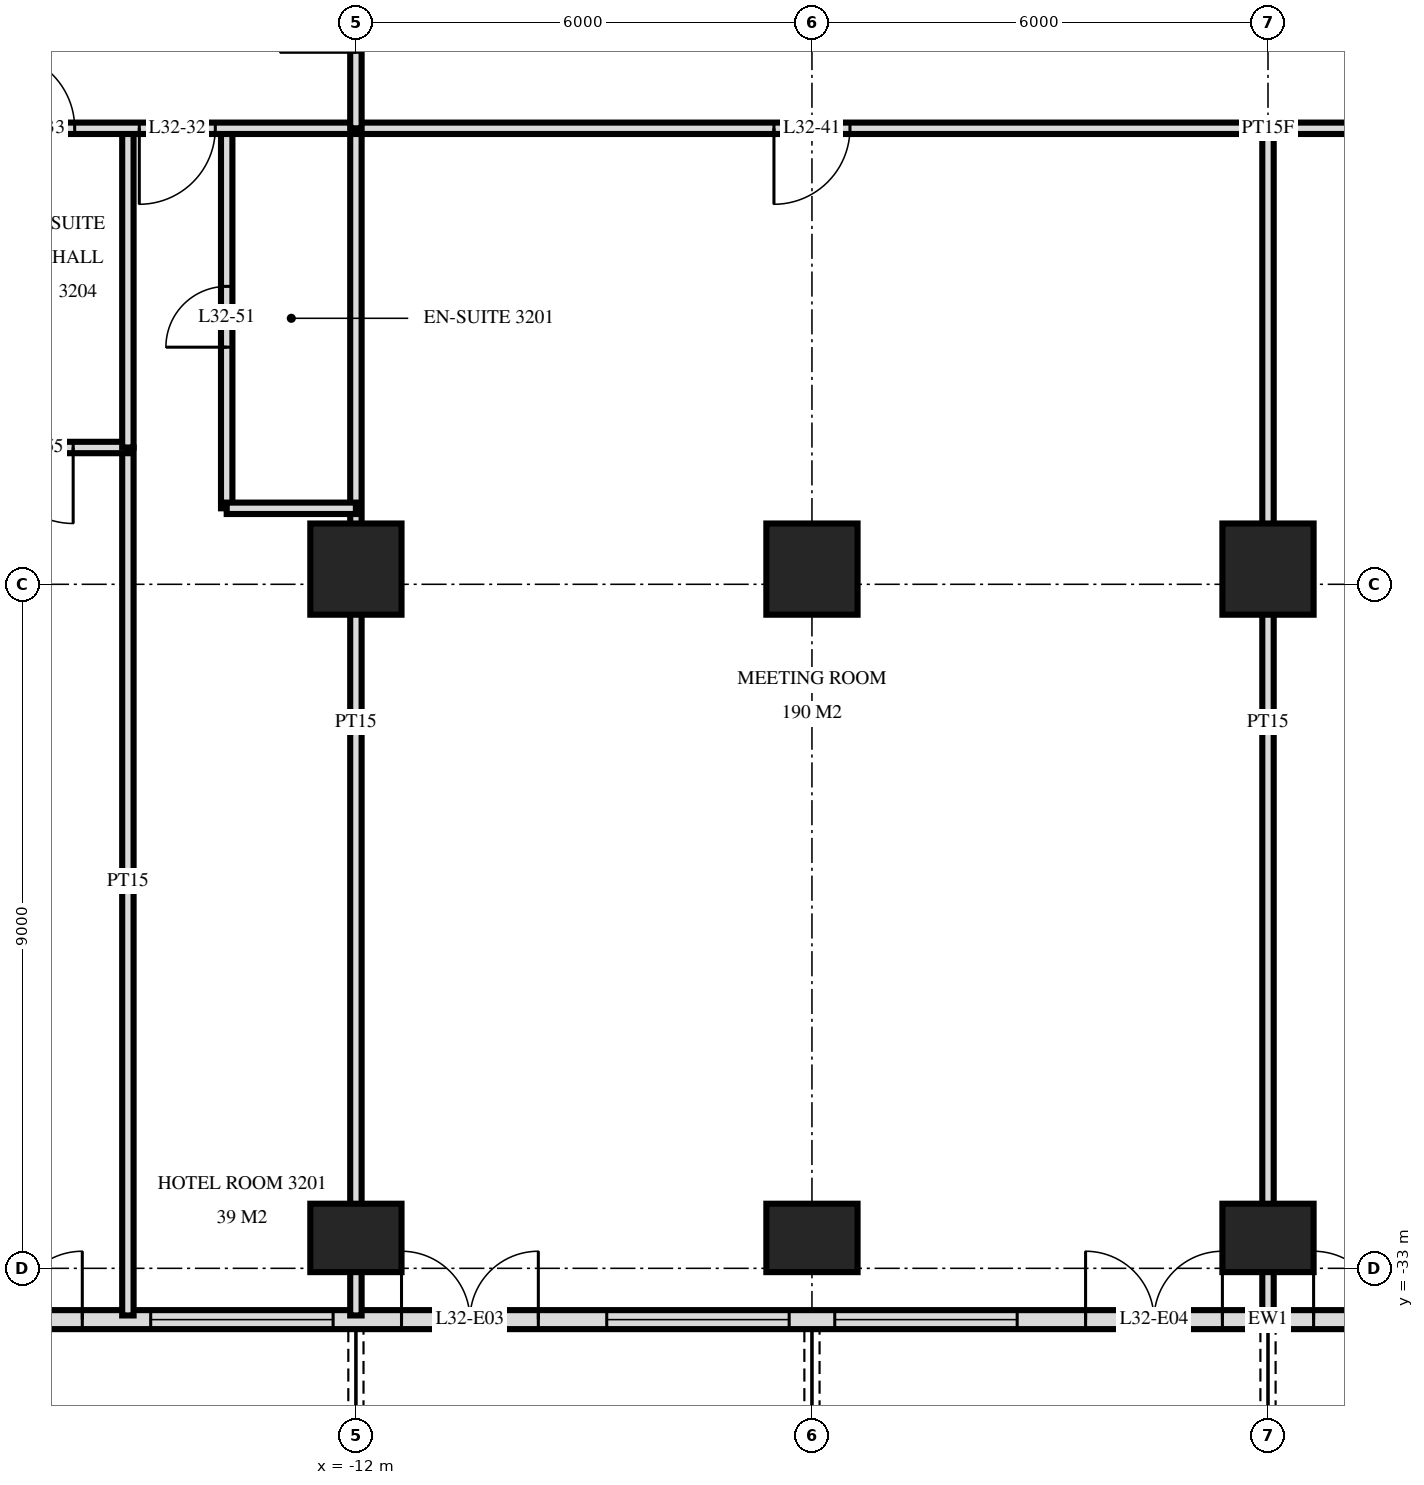
"""IFC4 building model, lengths in metres.
Left out: names, types, materials, properties, quantities, classifications, styles, units other than length and angle.
Written with IfcOpenShell. Run it as: python <this file> out.ifc"""

import sys

from ifc_helpers import new_model, si_unit, direction, frame, frame_2d, origin, origin_2d, place, context, subcontext, project, spatial, rectangle, extrude, element, fill, save


model = new_model("IFC4")
c1 = context("Model", 3, precision=1e-05, world=origin(), true_north=direction((0.0, 1.0)))
c2 = subcontext(c1, "Body", "Model", "MODEL_VIEW")
j1 = project(units=[si_unit("LENGTHUNIT", "METRE"), si_unit("PLANEANGLEUNIT", "RADIAN")], contexts=[c1])
p1 = place(None, origin())
s1 = spatial("IfcSite", under=j1, at=p1, CompositionType="ELEMENT")
p2 = place(p1, origin())
s2 = spatial("IfcBuilding", under=s1, at=p2, CompositionType="ELEMENT")
p3 = place(p2, frame((0.0, 0.0, 127.2)))
s3 = spatial("IfcBuildingStorey", under=s2, at=p3, CompositionType="ELEMENT", Elevation=127.2)
p4 = place(p3, frame((-12.0, -32.6, 0.0), z_axis=(0.0, 0.0, 1.0), x_axis=(1.0, 0.0, 0.0)))
e1 = element("IfcColumn", 1, at=p4, inside=s3, PredefinedType="COLUMN", context=c2, shape_type="SweptSolid", body=[
    extrude(rectangle(XDim=1.2, YDim=0.9, at=origin_2d()), origin(), (0.0, 0.0, 1.0), 3.6),
])
p5 = place(p3, frame((-12.0, -23.8, 0.0), z_axis=(0.0, 0.0, 1.0), x_axis=(1.0, 0.0, 0.0)))
e2 = element("IfcColumn", 2, at=p5, inside=s3, PredefinedType="COLUMN", context=c2, shape_type="SweptSolid", body=[
    extrude(rectangle(XDim=1.2, YDim=1.2, at=origin_2d()), origin(), (0.0, 0.0, 1.0), 3.6),
])
p6 = place(p3, frame((-6.0, -32.6, 0.0), z_axis=(0.0, 0.0, 1.0), x_axis=(1.0, 0.0, 0.0)))
e3 = element("IfcColumn", 3, at=p6, inside=s3, PredefinedType="COLUMN", context=c2, shape_type="SweptSolid", body=[
    extrude(rectangle(XDim=1.2, YDim=0.9, at=origin_2d()), origin(), (0.0, 0.0, 1.0), 3.6),
])
p7 = place(p3, frame((-6.0, -23.8, 0.0), z_axis=(0.0, 0.0, 1.0), x_axis=(1.0, 0.0, 0.0)))
e4 = element("IfcColumn", 4, at=p7, inside=s3, PredefinedType="COLUMN", context=c2, shape_type="SweptSolid", body=[
    extrude(rectangle(XDim=1.2, YDim=1.2, at=origin_2d()), origin(), (0.0, 0.0, 1.0), 3.6),
])
p8 = place(p3, frame((0.0, -32.6, 0.0), z_axis=(0.0, 0.0, 1.0), x_axis=(1.0, 0.0, 0.0)))
e5 = element("IfcColumn", 5, at=p8, inside=s3, PredefinedType="COLUMN", context=c2, shape_type="SweptSolid", body=[
    extrude(rectangle(XDim=1.2, YDim=0.9, at=origin_2d()), origin(), (0.0, 0.0, 1.0), 3.6),
])
p9 = place(p3, frame((0.0, -23.8, 0.0), z_axis=(0.0, 0.0, 1.0), x_axis=(1.0, 0.0, 0.0)))
e6 = element("IfcColumn", 6, at=p9, inside=s3, PredefinedType="COLUMN", context=c2, shape_type="SweptSolid", body=[
    extrude(rectangle(XDim=1.2, YDim=1.2, at=origin_2d()), origin(), (0.0, 0.0, 1.0), 3.6),
])
p10 = place(p3, frame((-23.675, -33.675, 0.0), z_axis=(0.0, 0.0, 1.0), x_axis=(1.0, 0.0, 0.0)))
e7 = element("IfcWall", 7, at=p10, inside=s3, PredefinedType="SOLIDWALL", context=c2, shape_type="SweptSolid", body=[
    extrude(rectangle(XDim=47.351, YDim=0.25, at=frame_2d((23.675, 0.0))), origin(), (0.0, 0.0, 1.0), 3.32),
])
p11 = place(p10, frame((3.425, 0.0, 0.0)))
e8 = element("IfcOpeningElement", 8, at=p11, cuts=e7, PredefinedType="OPENING", context=c2, shape_type="SweptSolid", body=[
    extrude(rectangle(XDim=1.8, YDim=2.4, at=frame_2d((0.9, 1.2))), frame((0.0, 0.135, 0.0), z_axis=(0.0, -1.0, 0.0), x_axis=(1.0, 0.0, 0.0)), (0.0, 0.0, 1.0), 0.27),
])
p12 = place(p10, frame((6.275, 0.0, 0.0)))
e9 = element("IfcOpeningElement", 9, at=p12, cuts=e7, PredefinedType="OPENING", context=c2, shape_type="SweptSolid", body=[
    extrude(rectangle(XDim=1.8, YDim=2.4, at=frame_2d((0.9, 1.2))), frame((0.0, 0.135, 0.0), z_axis=(0.0, -1.0, 0.0), x_axis=(1.0, 0.0, 0.0)), (0.0, 0.0, 1.0), 0.27),
])
p13 = place(p10, frame((8.975, 0.0, 0.3)))
e10 = element("IfcOpeningElement", 10, at=p13, cuts=e7, PredefinedType="OPENING", context=c2, shape_type="SweptSolid", body=[
    extrude(rectangle(XDim=2.4, YDim=2.1, at=frame_2d((1.2, 1.05))), frame((0.0, 0.135, 0.0), z_axis=(0.0, -1.0, 0.0), x_axis=(1.0, 0.0, 0.0)), (0.0, 0.0, 1.0), 0.27),
])
p14 = place(p10, frame((12.275, 0.0, 0.0)))
e11 = element("IfcOpeningElement", 11, at=p14, cuts=e7, PredefinedType="OPENING", context=c2, shape_type="SweptSolid", body=[
    extrude(rectangle(XDim=1.8, YDim=2.4, at=frame_2d((0.9, 1.2))), frame((0.0, 0.135, 0.0), z_axis=(0.0, -1.0, 0.0), x_axis=(1.0, 0.0, 0.0)), (0.0, 0.0, 1.0), 0.27),
])
p15 = place(p10, frame((14.975, 0.0, 0.3)))
e12 = element("IfcOpeningElement", 12, at=p15, cuts=e7, PredefinedType="OPENING", context=c2, shape_type="SweptSolid", body=[
    extrude(rectangle(XDim=2.4, YDim=2.1, at=frame_2d((1.2, 1.05))), frame((0.0, 0.135, 0.0), z_axis=(0.0, -1.0, 0.0), x_axis=(1.0, 0.0, 0.0)), (0.0, 0.0, 1.0), 0.27),
])
p16 = place(p10, frame((17.975, 0.0, 0.3)))
e13 = element("IfcOpeningElement", 13, at=p16, cuts=e7, PredefinedType="OPENING", context=c2, shape_type="SweptSolid", body=[
    extrude(rectangle(XDim=2.4, YDim=2.1, at=frame_2d((1.2, 1.05))), frame((0.0, 0.135, 0.0), z_axis=(0.0, -1.0, 0.0), x_axis=(1.0, 0.0, 0.0)), (0.0, 0.0, 1.0), 0.27),
])
p17 = place(p10, frame((21.275, 0.0, 0.0)))
e14 = element("IfcOpeningElement", 14, at=p17, cuts=e7, PredefinedType="OPENING", context=c2, shape_type="SweptSolid", body=[
    extrude(rectangle(XDim=1.8, YDim=2.4, at=frame_2d((0.9, 1.2))), frame((0.0, 0.135, 0.0), z_axis=(0.0, -1.0, 0.0), x_axis=(1.0, 0.0, 0.0)), (0.0, 0.0, 1.0), 0.27),
])
p18 = place(p10, frame((24.275, 0.0, 0.0)))
e15 = element("IfcOpeningElement", 15, at=p18, cuts=e7, PredefinedType="OPENING", context=c2, shape_type="SweptSolid", body=[
    extrude(rectangle(XDim=1.8, YDim=2.4, at=frame_2d((0.9, 1.2))), frame((0.0, 0.135, 0.0), z_axis=(0.0, -1.0, 0.0), x_axis=(1.0, 0.0, 0.0)), (0.0, 0.0, 1.0), 0.27),
])
p19 = place(p10, frame((26.975, 0.0, 0.3)))
e16 = element("IfcOpeningElement", 16, at=p19, cuts=e7, PredefinedType="OPENING", context=c2, shape_type="SweptSolid", body=[
    extrude(rectangle(XDim=2.4, YDim=2.1, at=frame_2d((1.2, 1.05))), frame((0.0, 0.135, 0.0), z_axis=(0.0, -1.0, 0.0), x_axis=(1.0, 0.0, 0.0)), (0.0, 0.0, 1.0), 0.27),
])
p20 = place(p10, frame((30.275, 0.0, 0.0)))
e17 = element("IfcOpeningElement", 17, at=p20, cuts=e7, PredefinedType="OPENING", context=c2, shape_type="SweptSolid", body=[
    extrude(rectangle(XDim=1.8, YDim=2.4, at=frame_2d((0.9, 1.2))), frame((0.0, 0.135, 0.0), z_axis=(0.0, -1.0, 0.0), x_axis=(1.0, 0.0, 0.0)), (0.0, 0.0, 1.0), 0.27),
])
p21 = place(p10, frame((32.975, 0.0, 0.3)))
e18 = element("IfcOpeningElement", 18, at=p21, cuts=e7, PredefinedType="OPENING", context=c2, shape_type="SweptSolid", body=[
    extrude(rectangle(XDim=2.4, YDim=2.1, at=frame_2d((1.2, 1.05))), frame((0.0, 0.135, 0.0), z_axis=(0.0, -1.0, 0.0), x_axis=(1.0, 0.0, 0.0)), (0.0, 0.0, 1.0), 0.27),
])
p22 = place(p10, frame((36.275, 0.0, 0.0)))
e19 = element("IfcOpeningElement", 19, at=p22, cuts=e7, PredefinedType="OPENING", context=c2, shape_type="SweptSolid", body=[
    extrude(rectangle(XDim=1.8, YDim=2.4, at=frame_2d((0.9, 1.2))), frame((0.0, 0.135, 0.0), z_axis=(0.0, -1.0, 0.0), x_axis=(1.0, 0.0, 0.0)), (0.0, 0.0, 1.0), 0.27),
])
p23 = place(p10, frame((38.975, 0.0, 0.3)))
e20 = element("IfcOpeningElement", 20, at=p23, cuts=e7, PredefinedType="OPENING", context=c2, shape_type="SweptSolid", body=[
    extrude(rectangle(XDim=2.4, YDim=2.1, at=frame_2d((1.2, 1.05))), frame((0.0, 0.135, 0.0), z_axis=(0.0, -1.0, 0.0), x_axis=(1.0, 0.0, 0.0)), (0.0, 0.0, 1.0), 0.27),
])
p24 = place(p10, frame((41.975, 0.0, 0.3)))
e21 = element("IfcOpeningElement", 21, at=p24, cuts=e7, PredefinedType="OPENING", context=c2, shape_type="SweptSolid", body=[
    extrude(rectangle(XDim=2.4, YDim=2.1, at=frame_2d((1.2, 1.05))), frame((0.0, 0.135, 0.0), z_axis=(0.0, -1.0, 0.0), x_axis=(1.0, 0.0, 0.0)), (0.0, 0.0, 1.0), 0.27),
])
p25 = place(p10, frame((45.125, 0.0, 0.0)))
e22 = element("IfcOpeningElement", 22, at=p25, cuts=e7, PredefinedType="OPENING", context=c2, shape_type="SweptSolid", body=[
    extrude(rectangle(XDim=1.8, YDim=2.4, at=frame_2d((0.9, 1.2))), frame((0.0, 0.135, 0.0), z_axis=(0.0, -1.0, 0.0), x_axis=(1.0, 0.0, 0.0)), (0.0, 0.0, 1.0), 0.27),
])
p26 = place(p3, frame((0.0, -33.62, 0.0), z_axis=(0.0, 0.0, 1.0), x_axis=(0.0, 1.0, 0.0)))
e23 = element("IfcWall", 23, at=p26, inside=s3, PredefinedType="PARTITIONING", context=c2, shape_type="SweptSolid", body=[
    extrude(rectangle(XDim=15.62, YDim=0.15, at=frame_2d((7.81, 0.0))), origin(), (0.0, 0.0, 1.0), 3.32),
])
p27 = place(p3, frame((-12.0, -18.0, 0.0), z_axis=(0.0, 0.0, 1.0), x_axis=(0.0, 1.0, 0.0)))
e24 = element("IfcWall", 24, at=p27, inside=s3, PredefinedType="PARTITIONING", context=c2, shape_type="SweptSolid", body=[
    extrude(rectangle(XDim=2.95, YDim=0.15, at=frame_2d((1.475, 0.0))), origin(), (0.0, 0.0, 1.0), 3.32),
])
p28 = place(p27, frame((1.0, 0.0, 0.0)))
e25 = element("IfcOpeningElement", 25, at=p28, cuts=e24, PredefinedType="OPENING", context=c2, shape_type="SweptSolid", body=[
    extrude(rectangle(XDim=1.0, YDim=2.1, at=frame_2d((0.5, 1.05))), frame((0.0, 0.085, 0.0), z_axis=(0.0, -1.0, 0.0), x_axis=(1.0, 0.0, 0.0)), (0.0, 0.0, 1.0), 0.17),
])
p29 = place(p3, frame((-12.0, -33.62, 0.0), z_axis=(0.0, 0.0, 1.0), x_axis=(0.0, 1.0, 0.0)))
e26 = element("IfcWall", 26, at=p29, inside=s3, PredefinedType="PARTITIONING", context=c2, shape_type="SweptSolid", body=[
    extrude(rectangle(XDim=15.62, YDim=0.15, at=frame_2d((7.81, 0.0))), origin(), (0.0, 0.0, 1.0), 3.32),
])
p30 = place(p3, frame((-13.7, -23.0, 0.0), z_axis=(0.0, 0.0, 1.0), x_axis=(0.0, 1.0, 0.0)))
e27 = element("IfcWall", 27, at=p30, inside=s3, PredefinedType="PARTITIONING", context=c2, shape_type="SweptSolid", body=[
    extrude(rectangle(XDim=5.0, YDim=0.15, at=frame_2d((2.5, 0.0))), origin(), (0.0, 0.0, 1.0), 3.32),
])
p31 = place(p30, frame((2.12, 0.0, 0.0)))
e28 = element("IfcOpeningElement", 28, at=p31, cuts=e27, PredefinedType="OPENING", context=c2, shape_type="SweptSolid", body=[
    extrude(rectangle(XDim=0.8, YDim=2.1, at=frame_2d((0.4, 1.05))), frame((0.0, 0.085, 0.0), z_axis=(0.0, -1.0, 0.0), x_axis=(1.0, 0.0, 0.0)), (0.0, 0.0, 1.0), 0.17),
])
p32 = place(p3, frame((-15.0, -22.2, 0.0), z_axis=(0.0, 0.0, 1.0), x_axis=(0.0, 1.0, 0.0)))
e29 = element("IfcWall", 29, at=p32, inside=s3, PredefinedType="PARTITIONING", context=c2, shape_type="SweptSolid", body=[
    extrude(rectangle(XDim=4.2, YDim=0.15, at=frame_2d((2.1, 0.0))), origin(), (0.0, 0.0, 1.0), 3.32),
])
p33 = place(p3, frame((-15.0, -33.62, 0.0), z_axis=(0.0, 0.0, 1.0), x_axis=(0.0, 1.0, 0.0)))
e30 = element("IfcWall", 30, at=p33, inside=s3, PredefinedType="PARTITIONING", context=c2, shape_type="SweptSolid", body=[
    extrude(rectangle(XDim=11.42, YDim=0.15, at=frame_2d((5.71, 0.0))), origin(), (0.0, 0.0, 1.0), 3.32),
])
p34 = place(p3, frame((-13.7, -23.0, 0.0), z_axis=(0.0, 0.0, 1.0), x_axis=(1.0, 0.0, 0.0)))
e31 = element("IfcWall", 31, at=p34, inside=s3, PredefinedType="PARTITIONING", context=c2, shape_type="SweptSolid", body=[
    extrude(rectangle(XDim=1.7, YDim=0.15, at=frame_2d((0.85, 0.0))), origin(), (0.0, 0.0, 1.0), 3.32),
])
p35 = place(p3, frame((-17.4, -22.2, 0.0), z_axis=(0.0, 0.0, 1.0), x_axis=(1.0, 0.0, 0.0)))
e32 = element("IfcWall", 32, at=p35, inside=s3, PredefinedType="PARTITIONING", context=c2, shape_type="SweptSolid", body=[
    extrude(rectangle(XDim=2.4, YDim=0.15, at=frame_2d((1.2, 0.0))), origin(), (0.0, 0.0, 1.0), 3.32),
])
p36 = place(p35, frame((0.68, 0.0, 0.0)))
e33 = element("IfcOpeningElement", 33, at=p36, cuts=e32, PredefinedType="OPENING", context=c2, shape_type="SweptSolid", body=[
    extrude(rectangle(XDim=1.0, YDim=2.1, at=frame_2d((0.5, 1.05))), frame((0.0, 0.085, 0.0), z_axis=(0.0, -1.0, 0.0), x_axis=(1.0, 0.0, 0.0)), (0.0, 0.0, 1.0), 0.17),
])
p37 = place(p3, frame((-28.02, -18.0, 0.0), z_axis=(0.0, 0.0, 1.0), x_axis=(1.0, 0.0, 0.0)))
e34 = element("IfcWall", 34, at=p37, inside=s3, PredefinedType="PARTITIONING", context=c2, shape_type="SweptSolid", body=[
    extrude(rectangle(XDim=56.04, YDim=0.15, at=frame_2d((28.02, 0.0))), origin(), (0.0, 0.0, 1.0), 3.32),
])
p38 = place(p37, frame((13.17, 0.0, 0.0)))
e35 = element("IfcOpeningElement", 35, at=p38, cuts=e34, PredefinedType="OPENING", context=c2, shape_type="SweptSolid", body=[
    extrude(rectangle(XDim=1.0, YDim=2.1, at=frame_2d((0.5, 1.05))), frame((0.0, 0.085, 0.0), z_axis=(0.0, -1.0, 0.0), x_axis=(1.0, 0.0, 0.0)), (0.0, 0.0, 1.0), 0.17),
])
p39 = place(p37, frame((11.32, 0.0, 0.0)))
e36 = element("IfcOpeningElement", 36, at=p39, cuts=e34, PredefinedType="OPENING", context=c2, shape_type="SweptSolid", body=[
    extrude(rectangle(XDim=1.0, YDim=2.1, at=frame_2d((0.5, 1.05))), frame((0.0, 0.085, 0.0), z_axis=(0.0, -1.0, 0.0), x_axis=(1.0, 0.0, 0.0)), (0.0, 0.0, 1.0), 0.17),
])
p40 = place(p37, frame((41.87, 0.0, 0.0)))
e37 = element("IfcOpeningElement", 37, at=p40, cuts=e34, PredefinedType="OPENING", context=c2, shape_type="SweptSolid", body=[
    extrude(rectangle(XDim=1.0, YDim=2.1, at=frame_2d((0.5, 1.05))), frame((0.0, 0.085, 0.0), z_axis=(0.0, -1.0, 0.0), x_axis=(1.0, 0.0, 0.0)), (0.0, 0.0, 1.0), 0.17),
])
p41 = place(p37, frame((43.17, 0.0, 0.0)))
e38 = element("IfcOpeningElement", 38, at=p41, cuts=e34, PredefinedType="OPENING", context=c2, shape_type="SweptSolid", body=[
    extrude(rectangle(XDim=1.0, YDim=2.1, at=frame_2d((0.5, 1.05))), frame((0.0, 0.085, 0.0), z_axis=(0.0, -1.0, 0.0), x_axis=(1.0, 0.0, 0.0)), (0.0, 0.0, 1.0), 0.17),
])
p42 = place(p37, frame((46.72, 0.0, 0.0)))
e39 = element("IfcOpeningElement", 39, at=p42, cuts=e34, PredefinedType="OPENING", context=c2, shape_type="SweptSolid", body=[
    extrude(rectangle(XDim=1.0, YDim=2.1, at=frame_2d((0.5, 1.05))), frame((0.0, 0.085, 0.0), z_axis=(0.0, -1.0, 0.0), x_axis=(1.0, 0.0, 0.0)), (0.0, 0.0, 1.0), 0.17),
])
p43 = place(p37, frame((21.52, 0.0, 0.0)))
e40 = element("IfcOpeningElement", 40, at=p43, cuts=e34, PredefinedType="OPENING", context=c2, shape_type="SweptSolid", body=[
    extrude(rectangle(XDim=1.0, YDim=2.1, at=frame_2d((0.5, 1.05))), frame((0.0, 0.085, 0.0), z_axis=(0.0, -1.0, 0.0), x_axis=(1.0, 0.0, 0.0)), (0.0, 0.0, 1.0), 0.17),
])
p44 = place(p37, frame((33.52, 0.0, 0.0)))
e41 = element("IfcOpeningElement", 41, at=p44, cuts=e34, PredefinedType="OPENING", context=c2, shape_type="SweptSolid", body=[
    extrude(rectangle(XDim=1.0, YDim=2.1, at=frame_2d((0.5, 1.05))), frame((0.0, 0.085, 0.0), z_axis=(0.0, -1.0, 0.0), x_axis=(1.0, 0.0, 0.0)), (0.0, 0.0, 1.0), 0.17),
])
p45 = place(p12, origin())
e42 = element("IfcDoor", 42, at=p45, inside=s3, OperationType="DOUBLE_DOOR_SINGLE_SWING", PredefinedType="DOOR", context=c2, shape_type="SweptSolid", body=[
    extrude(rectangle(XDim=1.8, YDim=2.4, at=frame_2d((0.9, 1.2))), frame((0.0, 0.025, 0.0), z_axis=(0.0, -1.0, 0.0), x_axis=(1.0, 0.0, 0.0)), (0.0, 0.0, 1.0), 0.05),
])
fill(e9, e42)
p46 = place(p13, origin())
e43 = element("IfcWindow", 43, at=p46, inside=s3, PartitioningType="SINGLE_PANEL", PredefinedType="WINDOW", context=c2, shape_type="SweptSolid", body=[
    extrude(rectangle(XDim=2.4, YDim=2.1, at=frame_2d((1.2, 1.05))), frame((0.0, 0.03, 0.0), z_axis=(0.0, -1.0, 0.0), x_axis=(1.0, 0.0, 0.0)), (0.0, 0.0, 1.0), 0.06),
])
fill(e10, e43)
p47 = place(p14, origin())
e44 = element("IfcDoor", 44, at=p47, inside=s3, OperationType="DOUBLE_DOOR_SINGLE_SWING", PredefinedType="DOOR", context=c2, shape_type="SweptSolid", body=[
    extrude(rectangle(XDim=1.8, YDim=2.4, at=frame_2d((0.9, 1.2))), frame((0.0, 0.025, 0.0), z_axis=(0.0, -1.0, 0.0), x_axis=(1.0, 0.0, 0.0)), (0.0, 0.0, 1.0), 0.05),
])
fill(e11, e44)
p48 = place(p15, origin())
e45 = element("IfcWindow", 45, at=p48, inside=s3, PartitioningType="SINGLE_PANEL", PredefinedType="WINDOW", context=c2, shape_type="SweptSolid", body=[
    extrude(rectangle(XDim=2.4, YDim=2.1, at=frame_2d((1.2, 1.05))), frame((0.0, 0.03, 0.0), z_axis=(0.0, -1.0, 0.0), x_axis=(1.0, 0.0, 0.0)), (0.0, 0.0, 1.0), 0.06),
])
fill(e12, e45)
p49 = place(p16, origin())
e46 = element("IfcWindow", 46, at=p49, inside=s3, PartitioningType="SINGLE_PANEL", PredefinedType="WINDOW", context=c2, shape_type="SweptSolid", body=[
    extrude(rectangle(XDim=2.4, YDim=2.1, at=frame_2d((1.2, 1.05))), frame((0.0, 0.03, 0.0), z_axis=(0.0, -1.0, 0.0), x_axis=(1.0, 0.0, 0.0)), (0.0, 0.0, 1.0), 0.06),
])
fill(e13, e46)
p50 = place(p17, origin())
e47 = element("IfcDoor", 47, at=p50, inside=s3, OperationType="DOUBLE_DOOR_SINGLE_SWING", PredefinedType="DOOR", context=c2, shape_type="SweptSolid", body=[
    extrude(rectangle(XDim=1.8, YDim=2.4, at=frame_2d((0.9, 1.2))), frame((0.0, 0.025, 0.0), z_axis=(0.0, -1.0, 0.0), x_axis=(1.0, 0.0, 0.0)), (0.0, 0.0, 1.0), 0.05),
])
fill(e14, e47)
p51 = place(p18, origin())
e48 = element("IfcDoor", 48, at=p51, inside=s3, OperationType="DOUBLE_DOOR_SINGLE_SWING", PredefinedType="DOOR", context=c2, shape_type="SweptSolid", body=[
    extrude(rectangle(XDim=1.8, YDim=2.4, at=frame_2d((0.9, 1.2))), frame((0.0, 0.025, 0.0), z_axis=(0.0, -1.0, 0.0), x_axis=(1.0, 0.0, 0.0)), (0.0, 0.0, 1.0), 0.05),
])
fill(e15, e48)
p52 = place(p38, frame((0.5, 0.0, 0.0), z_axis=(0.0, 0.0, 1.0), x_axis=(-1.0, 0.0, 0.0)))
e49 = element("IfcDoor", 49, at=p52, inside=s3, OperationType="SINGLE_SWING_LEFT", PredefinedType="DOOR", context=c2, shape_type="SweptSolid", body=[
    extrude(rectangle(XDim=1.0, YDim=2.1, at=frame_2d((0.0, 1.05))), frame((0.0, -0.025, 0.0), z_axis=(0.0, 1.0, 0.0), x_axis=(-1.0, 0.0, 0.0)), (0.0, 0.0, 1.0), 0.05),
])
fill(e35, e49)
p53 = place(p39, origin())
e50 = element("IfcDoor", 50, at=p53, inside=s3, OperationType="SINGLE_SWING_RIGHT", PredefinedType="DOOR", context=c2, shape_type="SweptSolid", body=[
    extrude(rectangle(XDim=1.0, YDim=2.1, at=frame_2d((0.5, 1.05))), frame((0.0, 0.025, 0.0), z_axis=(0.0, -1.0, 0.0), x_axis=(1.0, 0.0, 0.0)), (0.0, 0.0, 1.0), 0.05),
])
fill(e36, e50)
p54 = place(p43, frame((0.5, 0.0, 0.0), z_axis=(0.0, 0.0, 1.0), x_axis=(-1.0, 0.0, 0.0)))
e51 = element("IfcDoor", 51, at=p54, inside=s3, OperationType="SINGLE_SWING_LEFT", PredefinedType="DOOR", context=c2, shape_type="SweptSolid", body=[
    extrude(rectangle(XDim=1.0, YDim=2.1, at=frame_2d((0.0, 1.05))), frame((0.0, -0.025, 0.0), z_axis=(0.0, 1.0, 0.0), x_axis=(-1.0, 0.0, 0.0)), (0.0, 0.0, 1.0), 0.05),
])
fill(e40, e51)
p55 = place(p31, origin())
e52 = element("IfcDoor", 52, at=p55, inside=s3, OperationType="SINGLE_SWING_RIGHT", PredefinedType="DOOR", context=c2, shape_type="SweptSolid", body=[
    extrude(rectangle(XDim=0.8, YDim=2.1, at=frame_2d((0.4, 1.05))), frame((0.0, 0.025, 0.0), z_axis=(0.0, -1.0, 0.0), x_axis=(1.0, 0.0, 0.0)), (0.0, 0.0, 1.0), 0.05),
])
fill(e28, e52)
p56 = place(p36, frame((0.5, 0.0, 0.0), z_axis=(0.0, 0.0, 1.0), x_axis=(-1.0, 0.0, 0.0)))
e53 = element("IfcDoor", 53, at=p56, inside=s3, OperationType="SINGLE_SWING_RIGHT", PredefinedType="DOOR", context=c2, shape_type="SweptSolid", body=[
    extrude(rectangle(XDim=1.0, YDim=2.1, at=frame_2d((0.0, 1.05))), frame((0.0, -0.025, 0.0), z_axis=(0.0, 1.0, 0.0), x_axis=(-1.0, 0.0, 0.0)), (0.0, 0.0, 1.0), 0.05),
])
fill(e33, e53)
save(model, sys.argv[1])
